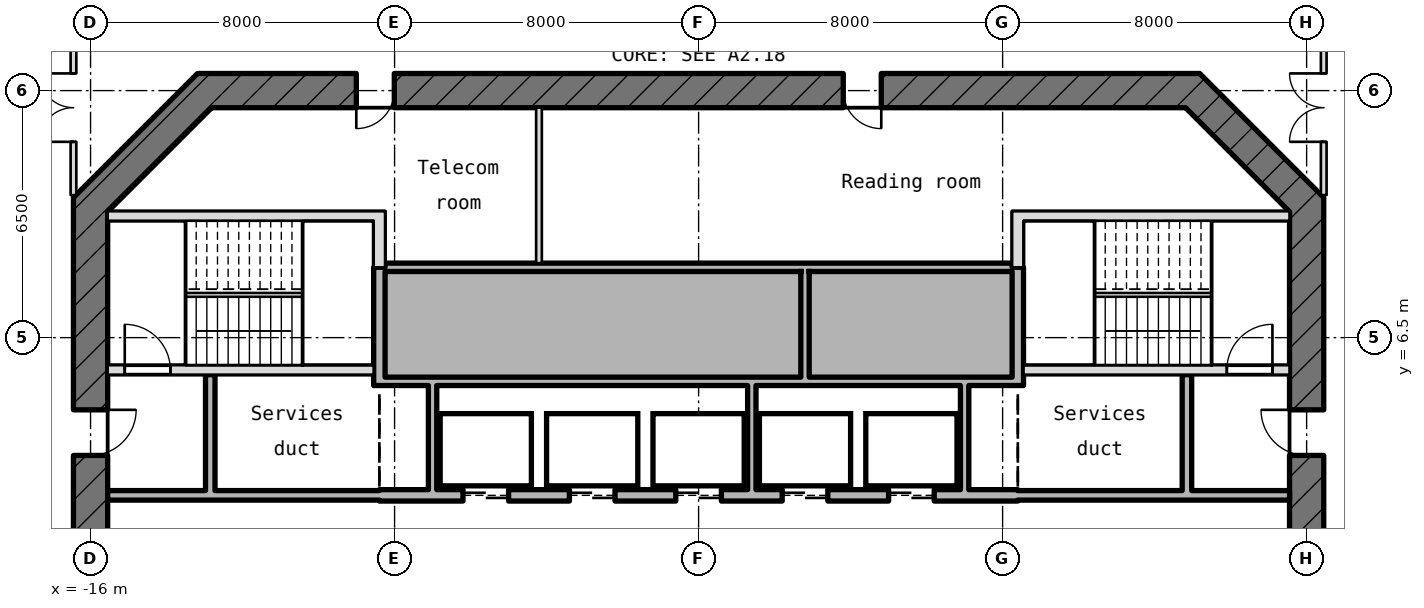
"""IFC4 building model, lengths in metres.
Left out: names, types, materials, properties, quantities, classifications, styles, units other than length and angle.
Written with IfcOpenShell. Run it as: python <this file> out.ifc"""

import sys

from ifc_helpers import new_model, si_unit, direction, frame, frame_2d, origin, place, context, subcontext, project, spatial, rectangle, extrude, element, fill, save


model = new_model("IFC4")
c1 = context("Model", 3, precision=1e-05, world=origin(), true_north=direction((0.0, 1.0)))
c2 = subcontext(c1, "Body", "Model", "MODEL_VIEW")
j1 = project(units=[si_unit("LENGTHUNIT", "METRE"), si_unit("PLANEANGLEUNIT", "RADIAN")], contexts=[c1])
p1 = place(None, origin())
s1 = spatial("IfcSite", under=j1, at=p1, CompositionType="ELEMENT")
p2 = place(p1, origin())
s2 = spatial("IfcBuilding", under=s1, at=p2, CompositionType="ELEMENT")
p3 = place(p2, frame((0.0, 0.0, 185.95)))
s3 = spatial("IfcBuildingStorey", under=s2, at=p3, CompositionType="ELEMENT", Elevation=185.95)
p4 = place(p3, frame((16.0, -10.186, -0.18), z_axis=(0.0, 0.0, 1.0), x_axis=(0.0, 1.0, 0.0)))
e1 = element("IfcWall", 1, at=p4, inside=s3, PredefinedType="SHEAR", context=c2, shape_type="SweptSolid", body=[
    extrude(rectangle(XDim=20.373, YDim=0.9, at=frame_2d((10.186, 0.0))), origin(), (0.0, 0.0, 1.0), 4.15),
])
p5 = place(p4, frame((8.986, 0.0, 0.18)))
e2 = element("IfcOpeningElement", 2, at=p5, cuts=e1, PredefinedType="OPENING", context=c2, shape_type="SweptSolid", body=[
    extrude(rectangle(XDim=2.4, YDim=2.1, at=frame_2d((1.2, 1.05))), frame((0.0, 0.46, 0.0), z_axis=(0.0, -1.0, 0.0), x_axis=(1.0, 0.0, 0.0)), (0.0, 0.0, 1.0), 0.92),
])
p6 = place(p4, frame((13.586, 0.0, 0.18)))
e3 = element("IfcOpeningElement", 3, at=p6, cuts=e1, PredefinedType="OPENING", context=c2, shape_type="SweptSolid", body=[
    extrude(rectangle(XDim=1.2, YDim=2.1, at=frame_2d((0.6, 1.05))), frame((0.0, 0.46, 0.0), z_axis=(0.0, -1.0, 0.0), x_axis=(1.0, 0.0, 0.0)), (0.0, 0.0, 1.0), 0.92),
])
p7 = place(p4, frame((2.4, 0.0, 0.18)))
e4 = element("IfcOpeningElement", 4, at=p7, cuts=e1, PredefinedType="OPENING", context=c2, shape_type="SweptSolid", body=[
    extrude(rectangle(XDim=1.2, YDim=2.1, at=frame_2d((0.6, 1.05))), frame((0.0, 0.46, 0.0), z_axis=(0.0, -1.0, 0.0), x_axis=(1.0, 0.0, 0.0)), (0.0, 0.0, 1.0), 0.92),
])
p8 = place(p3, frame((16.132, 9.868, -0.18), z_axis=(0.0, 0.0, 1.0), x_axis=(-0.707106781187, 0.707106781187, 0.0)))
e5 = element("IfcWall", 5, at=p8, inside=s3, PredefinedType="SHEAR", context=c2, shape_type="SweptSolid", body=[
    extrude(rectangle(XDim=4.615, YDim=0.9, at=frame_2d((2.308, 0.0))), origin(), (0.0, 0.0, 1.0), 4.15),
])
p9 = place(p3, frame((13.186, 13.0, -0.18), z_axis=(0.0, 0.0, 1.0), x_axis=(-1.0, 0.0, 0.0)))
e6 = element("IfcWall", 6, at=p9, inside=s3, PredefinedType="SHEAR", context=c2, shape_type="SweptSolid", body=[
    extrude(rectangle(XDim=26.373, YDim=0.9, at=frame_2d((13.186, 0.0))), origin(), (0.0, 0.0, 1.0), 4.15),
])
p10 = place(p9, frame((21.193, 0.0, 0.18)))
e7 = element("IfcOpeningElement", 7, at=p10, cuts=e6, PredefinedType="OPENING", context=c2, shape_type="SweptSolid", body=[
    extrude(rectangle(XDim=1.0, YDim=2.1, at=frame_2d((0.5, 1.05))), frame((0.0, 0.46, 0.0), z_axis=(0.0, -1.0, 0.0), x_axis=(1.0, 0.0, 0.0)), (0.0, 0.0, 1.0), 0.92),
])
p11 = place(p9, frame((8.379, 0.0, 0.18)))
e8 = element("IfcOpeningElement", 8, at=p11, cuts=e6, PredefinedType="OPENING", context=c2, shape_type="SweptSolid", body=[
    extrude(rectangle(XDim=1.0, YDim=2.1, at=frame_2d((0.5, 1.05))), frame((0.0, 0.46, 0.0), z_axis=(0.0, -1.0, 0.0), x_axis=(1.0, 0.0, 0.0)), (0.0, 0.0, 1.0), 0.92),
])
p12 = place(p3, frame((-12.868, 13.132, -0.18), z_axis=(0.0, 0.0, 1.0), x_axis=(-0.707106781187, -0.707106781187, 0.0)))
e9 = element("IfcWall", 9, at=p12, inside=s3, PredefinedType="SHEAR", context=c2, shape_type="SweptSolid", body=[
    extrude(rectangle(XDim=4.615, YDim=0.9, at=frame_2d((2.308, 0.0))), origin(), (0.0, 0.0, 1.0), 4.15),
])
p13 = place(p3, frame((-16.0, 10.186, -0.18), z_axis=(0.0, 0.0, 1.0), x_axis=(0.0, -1.0, 0.0)))
e10 = element("IfcWall", 10, at=p13, inside=s3, PredefinedType="SHEAR", context=c2, shape_type="SweptSolid", body=[
    extrude(rectangle(XDim=20.373, YDim=0.9, at=frame_2d((10.186, 0.0))), origin(), (0.0, 0.0, 1.0), 4.15),
])
p14 = place(p13, frame((8.986, 0.0, 0.18)))
e11 = element("IfcOpeningElement", 11, at=p14, cuts=e10, PredefinedType="OPENING", context=c2, shape_type="SweptSolid", body=[
    extrude(rectangle(XDim=2.4, YDim=2.1, at=frame_2d((1.2, 1.05))), frame((0.0, 0.46, 0.0), z_axis=(0.0, -1.0, 0.0), x_axis=(1.0, 0.0, 0.0)), (0.0, 0.0, 1.0), 0.92),
])
p15 = place(p13, frame((5.586, 0.0, 0.18)))
e12 = element("IfcOpeningElement", 12, at=p15, cuts=e10, PredefinedType="OPENING", context=c2, shape_type="SweptSolid", body=[
    extrude(rectangle(XDim=1.2, YDim=2.1, at=frame_2d((0.6, 1.05))), frame((0.0, 0.46, 0.0), z_axis=(0.0, -1.0, 0.0), x_axis=(1.0, 0.0, 0.0)), (0.0, 0.0, 1.0), 0.92),
])
p16 = place(p3, frame((-15.55, 2.35, 0.0), z_axis=(0.0, 0.0, 1.0), x_axis=(1.0, 0.0, 0.0)))
e13 = element("IfcWall", 13, at=p16, inside=s3, PredefinedType="STANDARD", context=c2, shape_type="SweptSolid", body=[
    extrude(rectangle(XDim=7.15, YDim=0.25, at=frame_2d((3.575, 0.0))), origin(), (0.0, 0.0, 1.0), 3.97),
])
p17 = place(p3, frame((-8.4, 2.35, -0.18), z_axis=(0.0, 0.0, 1.0), x_axis=(1.0, 0.0, 0.0)))
e14 = element("IfcWall", 14, at=p17, inside=s3, PredefinedType="SHEAR", context=c2, shape_type="SweptSolid", body=[
    extrude(rectangle(XDim=16.8, YDim=0.3, at=frame_2d((8.4, 0.0))), origin(), (0.0, 0.0, 1.0), 4.15),
])
p18 = place(p17, frame((2.2, 0.0, 0.18)))
e15 = element("IfcOpeningElement", 15, at=p18, cuts=e14, PredefinedType="OPENING", context=c2, shape_type="SweptSolid", body=[
    extrude(rectangle(XDim=1.2, YDim=2.1, at=frame_2d((0.6, 1.05))), frame((0.0, 0.16, 0.0), z_axis=(0.0, -1.0, 0.0), x_axis=(1.0, 0.0, 0.0)), (0.0, 0.0, 1.0), 0.32),
])
p19 = place(p17, frame((5.0, 0.0, 0.18)))
e16 = element("IfcOpeningElement", 16, at=p19, cuts=e14, PredefinedType="OPENING", context=c2, shape_type="SweptSolid", body=[
    extrude(rectangle(XDim=1.2, YDim=2.1, at=frame_2d((0.6, 1.05))), frame((0.0, 0.16, 0.0), z_axis=(0.0, -1.0, 0.0), x_axis=(1.0, 0.0, 0.0)), (0.0, 0.0, 1.0), 0.32),
])
p20 = place(p17, frame((7.8, 0.0, 0.18)))
e17 = element("IfcOpeningElement", 17, at=p20, cuts=e14, PredefinedType="OPENING", context=c2, shape_type="SweptSolid", body=[
    extrude(rectangle(XDim=1.2, YDim=2.1, at=frame_2d((0.6, 1.05))), frame((0.0, 0.16, 0.0), z_axis=(0.0, -1.0, 0.0), x_axis=(1.0, 0.0, 0.0)), (0.0, 0.0, 1.0), 0.32),
])
p21 = place(p17, frame((10.6, 0.0, 0.18)))
e18 = element("IfcOpeningElement", 18, at=p21, cuts=e14, PredefinedType="OPENING", context=c2, shape_type="SweptSolid", body=[
    extrude(rectangle(XDim=1.2, YDim=2.1, at=frame_2d((0.6, 1.05))), frame((0.0, 0.16, 0.0), z_axis=(0.0, -1.0, 0.0), x_axis=(1.0, 0.0, 0.0)), (0.0, 0.0, 1.0), 0.32),
])
p22 = place(p17, frame((13.4, 0.0, 0.18)))
e19 = element("IfcOpeningElement", 19, at=p22, cuts=e14, PredefinedType="OPENING", context=c2, shape_type="SweptSolid", body=[
    extrude(rectangle(XDim=1.2, YDim=2.1, at=frame_2d((0.6, 1.05))), frame((0.0, 0.16, 0.0), z_axis=(0.0, -1.0, 0.0), x_axis=(1.0, 0.0, 0.0)), (0.0, 0.0, 1.0), 0.32),
])
p23 = place(p3, frame((8.4, 2.35, 0.0), z_axis=(0.0, 0.0, 1.0), x_axis=(1.0, 0.0, 0.0)))
e20 = element("IfcWall", 20, at=p23, inside=s3, PredefinedType="STANDARD", context=c2, shape_type="SweptSolid", body=[
    extrude(rectangle(XDim=7.15, YDim=0.25, at=frame_2d((3.575, 0.0))), origin(), (0.0, 0.0, 1.0), 3.97),
])
p24 = place(p3, frame((-8.25, 5.35, 0.0), z_axis=(0.0, 0.0, 1.0), x_axis=(1.0, 0.0, 0.0)))
e21 = element("IfcWall", 21, at=p24, inside=s3, PredefinedType="STANDARD", context=c2, shape_type="SweptSolid", body=[
    extrude(rectangle(XDim=16.5, YDim=0.22, at=frame_2d((8.25, 0.0))), origin(), (0.0, 0.0, 1.0), 3.97),
])
p25 = place(p3, frame((-15.55, 5.65, -0.18), z_axis=(0.0, 0.0, 1.0), x_axis=(1.0, 0.0, 0.0)))
e22 = element("IfcWall", 22, at=p25, inside=s3, PredefinedType="SHEAR", context=c2, shape_type="SweptSolid", body=[
    extrude(rectangle(XDim=7.0, YDim=0.25, at=frame_2d((3.5, 0.0))), origin(), (0.0, 0.0, 1.0), 4.15),
])
p26 = place(p25, frame((0.45, 0.0, 0.18)))
e23 = element("IfcOpeningElement", 23, at=p26, cuts=e22, PredefinedType="OPENING", context=c2, shape_type="SweptSolid", body=[
    extrude(rectangle(XDim=1.2, YDim=2.1, at=frame_2d((0.6, 1.05))), frame((0.0, 0.135, 0.0), z_axis=(0.0, -1.0, 0.0), x_axis=(1.0, 0.0, 0.0)), (0.0, 0.0, 1.0), 0.27),
])
p27 = place(p3, frame((8.55, 5.65, -0.18), z_axis=(0.0, 0.0, 1.0), x_axis=(1.0, 0.0, 0.0)))
e24 = element("IfcWall", 24, at=p27, inside=s3, PredefinedType="SHEAR", context=c2, shape_type="SweptSolid", body=[
    extrude(rectangle(XDim=7.0, YDim=0.25, at=frame_2d((3.5, 0.0))), origin(), (0.0, 0.0, 1.0), 4.15),
])
p28 = place(p27, frame((5.35, 0.0, 0.18)))
e25 = element("IfcOpeningElement", 25, at=p28, cuts=e24, PredefinedType="OPENING", context=c2, shape_type="SweptSolid", body=[
    extrude(rectangle(XDim=1.2, YDim=2.1, at=frame_2d((0.6, 1.05))), frame((0.0, 0.135, 0.0), z_axis=(0.0, -1.0, 0.0), x_axis=(1.0, 0.0, 0.0)), (0.0, 0.0, 1.0), 0.27),
])
p29 = place(p3, frame((-8.25, 8.35, 0.0), z_axis=(0.0, 0.0, 1.0), x_axis=(1.0, 0.0, 0.0)))
e26 = element("IfcWall", 26, at=p29, inside=s3, PredefinedType="STANDARD", context=c2, shape_type="SweptSolid", body=[
    extrude(rectangle(XDim=16.5, YDim=0.22, at=frame_2d((8.25, 0.0))), origin(), (0.0, 0.0, 1.0), 3.97),
])
for number, where, z_axis, x_axis in (
    (27, (-15.55, 9.7, -0.18), (0.0, 0.0, 1.0), (1.0, 0.0, 0.0)),
    (28, (8.55, 9.7, -0.18), (0.0, 0.0, 1.0), (1.0, 0.0, 0.0)),
):
    element("IfcWall", number, at=place(p3, frame(where, z_axis=z_axis, x_axis=x_axis)), inside=s3, PredefinedType="SHEAR", context=c2, shape_type="SweptSolid", body=[
        extrude(rectangle(XDim=7.0, YDim=0.25, at=frame_2d((3.5, 0.0))), origin(), (0.0, 0.0, 1.0), 4.15),
    ])
p30 = place(p3, frame((-12.85, 2.475, 0.0), z_axis=(0.0, 0.0, 1.0), x_axis=(0.0, 1.0, 0.0)))
e29 = element("IfcWall", 29, at=p30, inside=s3, PredefinedType="STANDARD", context=c2, shape_type="SweptSolid", body=[
    extrude(rectangle(XDim=3.05, YDim=0.25, at=frame_2d((1.525, 0.0))), origin(), (0.0, 0.0, 1.0), 3.97),
])
p31 = place(p3, frame((-8.4, 5.24, -0.18), z_axis=(0.0, 0.0, 1.0), x_axis=(0.0, 1.0, 0.0)))
e30 = element("IfcWall", 30, at=p31, inside=s3, PredefinedType="SHEAR", context=c2, shape_type="SweptSolid", body=[
    extrude(rectangle(XDim=3.11, YDim=0.3, at=frame_2d((1.555, 0.0))), origin(), (0.0, 0.0, 1.0), 4.15),
])
p32 = place(p3, frame((-8.4, 8.35, -0.18), z_axis=(0.0, 0.0, 1.0), x_axis=(0.0, 1.0, 0.0)))
e31 = element("IfcWall", 31, at=p32, inside=s3, PredefinedType="SHEAR", context=c2, shape_type="SweptSolid", body=[
    extrude(rectangle(XDim=1.475, YDim=0.3, at=frame_2d((0.737, 0.0))), origin(), (0.0, 0.0, 1.0), 4.15),
])
p33 = place(p3, frame((-7.0, 2.5, 0.0), z_axis=(0.0, 0.0, 1.0), x_axis=(0.0, 1.0, 0.0)))
e32 = element("IfcWall", 32, at=p33, inside=s3, PredefinedType="STANDARD", context=c2, shape_type="SweptSolid", body=[
    extrude(rectangle(XDim=2.74, YDim=0.22, at=frame_2d((1.37, 0.0))), origin(), (0.0, 0.0, 1.0), 3.97),
])
p34 = place(p3, frame((-4.2, 8.46, 0.0), z_axis=(0.0, 0.0, 1.0), x_axis=(0.0, 1.0, 0.0)))
e33 = element("IfcWall", 33, at=p34, inside=s3, PredefinedType="PARTITIONING", context=c2, shape_type="SweptSolid", body=[
    extrude(rectangle(XDim=4.09, YDim=0.15, at=frame_2d((2.045, 0.0))), origin(), (0.0, 0.0, 1.0), 3.97),
])
p35 = place(p3, frame((1.4, 2.5, 0.0), z_axis=(0.0, 0.0, 1.0), x_axis=(0.0, 1.0, 0.0)))
e34 = element("IfcWall", 34, at=p35, inside=s3, PredefinedType="STANDARD", context=c2, shape_type="SweptSolid", body=[
    extrude(rectangle(XDim=2.74, YDim=0.22, at=frame_2d((1.37, 0.0))), origin(), (0.0, 0.0, 1.0), 3.97),
])
p36 = place(p3, frame((2.8, 5.46, 0.0), z_axis=(0.0, 0.0, 1.0), x_axis=(0.0, 1.0, 0.0)))
e35 = element("IfcWall", 35, at=p36, inside=s3, PredefinedType="STANDARD", context=c2, shape_type="SweptSolid", body=[
    extrude(rectangle(XDim=2.78, YDim=0.22, at=frame_2d((1.39, 0.0))), origin(), (0.0, 0.0, 1.0), 3.97),
])
p37 = place(p3, frame((7.0, 2.5, 0.0), z_axis=(0.0, 0.0, 1.0), x_axis=(0.0, 1.0, 0.0)))
e36 = element("IfcWall", 36, at=p37, inside=s3, PredefinedType="STANDARD", context=c2, shape_type="SweptSolid", body=[
    extrude(rectangle(XDim=2.74, YDim=0.22, at=frame_2d((1.37, 0.0))), origin(), (0.0, 0.0, 1.0), 3.97),
])
p38 = place(p3, frame((8.4, 5.24, -0.18), z_axis=(0.0, 0.0, 1.0), x_axis=(0.0, 1.0, 0.0)))
e37 = element("IfcWall", 37, at=p38, inside=s3, PredefinedType="SHEAR", context=c2, shape_type="SweptSolid", body=[
    extrude(rectangle(XDim=3.11, YDim=0.3, at=frame_2d((1.555, 0.0))), origin(), (0.0, 0.0, 1.0), 4.15),
])
p39 = place(p3, frame((8.4, 8.35, -0.18), z_axis=(0.0, 0.0, 1.0), x_axis=(0.0, 1.0, 0.0)))
e38 = element("IfcWall", 38, at=p39, inside=s3, PredefinedType="SHEAR", context=c2, shape_type="SweptSolid", body=[
    extrude(rectangle(XDim=1.475, YDim=0.3, at=frame_2d((0.737, 0.0))), origin(), (0.0, 0.0, 1.0), 4.15),
])
p40 = place(p3, frame((12.85, 2.475, 0.0), z_axis=(0.0, 0.0, 1.0), x_axis=(0.0, 1.0, 0.0)))
e39 = element("IfcWall", 39, at=p40, inside=s3, PredefinedType="STANDARD", context=c2, shape_type="SweptSolid", body=[
    extrude(rectangle(XDim=3.05, YDim=0.25, at=frame_2d((1.525, 0.0))), origin(), (0.0, 0.0, 1.0), 3.97),
])
p41 = place(p3, frame((-16.45, 10.25, 0.0), z_axis=(0.0, 0.0, 1.0), x_axis=(0.0, 1.0, 0.0)))
e40 = element("IfcWall", 40, at=p41, inside=s3, PredefinedType="PARTITIONING", context=c2, shape_type="SweptSolid", body=[
    extrude(rectangle(XDim=7.016, YDim=0.15, at=frame_2d((3.508, 0.0))), origin(), (0.0, 0.0, 1.0), 3.97),
])
p42 = place(p41, frame((1.402, 0.0, 0.0)))
e41 = element("IfcOpeningElement", 41, at=p42, cuts=e40, PredefinedType="OPENING", context=c2, shape_type="SweptSolid", body=[
    extrude(rectangle(XDim=1.8, YDim=2.1, at=frame_2d((0.9, 1.05))), frame((0.0, 0.085, 0.0), z_axis=(0.0, -1.0, 0.0), x_axis=(1.0, 0.0, 0.0)), (0.0, 0.0, 1.0), 0.17),
])
p43 = place(p3, frame((16.45, 10.25, 0.0), z_axis=(0.0, 0.0, 1.0), x_axis=(0.0, 1.0, 0.0)))
e42 = element("IfcWall", 42, at=p43, inside=s3, PredefinedType="PARTITIONING", context=c2, shape_type="SweptSolid", body=[
    extrude(rectangle(XDim=7.016, YDim=0.15, at=frame_2d((3.508, 0.0))), origin(), (0.0, 0.0, 1.0), 3.97),
])
p44 = place(p43, frame((1.402, 0.0, 0.0)))
e43 = element("IfcOpeningElement", 43, at=p44, cuts=e42, PredefinedType="OPENING", context=c2, shape_type="SweptSolid", body=[
    extrude(rectangle(XDim=1.8, YDim=2.1, at=frame_2d((0.9, 1.05))), frame((0.0, 0.085, 0.0), z_axis=(0.0, -1.0, 0.0), x_axis=(1.0, 0.0, 0.0)), (0.0, 0.0, 1.0), 0.17),
])
p45 = place(p18, origin())
e44 = element("IfcDoor", 44, at=p45, inside=s3, OperationType="DOUBLE_DOOR_SLIDING", PredefinedType="DOOR", context=c2, shape_type="SweptSolid", body=[
    extrude(rectangle(XDim=1.2, YDim=2.1, at=frame_2d((0.6, 1.05))), frame((0.0, 0.025, 0.0), z_axis=(0.0, -1.0, 0.0), x_axis=(1.0, 0.0, 0.0)), (0.0, 0.0, 1.0), 0.05),
])
fill(e15, e44)
p46 = place(p19, origin())
e45 = element("IfcDoor", 45, at=p46, inside=s3, OperationType="DOUBLE_DOOR_SLIDING", PredefinedType="DOOR", context=c2, shape_type="SweptSolid", body=[
    extrude(rectangle(XDim=1.2, YDim=2.1, at=frame_2d((0.6, 1.05))), frame((0.0, 0.025, 0.0), z_axis=(0.0, -1.0, 0.0), x_axis=(1.0, 0.0, 0.0)), (0.0, 0.0, 1.0), 0.05),
])
fill(e16, e45)
p47 = place(p20, origin())
e46 = element("IfcDoor", 46, at=p47, inside=s3, OperationType="DOUBLE_DOOR_SLIDING", PredefinedType="DOOR", context=c2, shape_type="SweptSolid", body=[
    extrude(rectangle(XDim=1.2, YDim=2.1, at=frame_2d((0.6, 1.05))), frame((0.0, 0.025, 0.0), z_axis=(0.0, -1.0, 0.0), x_axis=(1.0, 0.0, 0.0)), (0.0, 0.0, 1.0), 0.05),
])
fill(e17, e46)
p48 = place(p21, origin())
e47 = element("IfcDoor", 47, at=p48, inside=s3, OperationType="DOUBLE_DOOR_SLIDING", PredefinedType="DOOR", context=c2, shape_type="SweptSolid", body=[
    extrude(rectangle(XDim=1.2, YDim=2.1, at=frame_2d((0.6, 1.05))), frame((0.0, 0.025, 0.0), z_axis=(0.0, -1.0, 0.0), x_axis=(1.0, 0.0, 0.0)), (0.0, 0.0, 1.0), 0.05),
])
fill(e18, e47)
p49 = place(p22, origin())
e48 = element("IfcDoor", 48, at=p49, inside=s3, OperationType="DOUBLE_DOOR_SLIDING", PredefinedType="DOOR", context=c2, shape_type="SweptSolid", body=[
    extrude(rectangle(XDim=1.2, YDim=2.1, at=frame_2d((0.6, 1.05))), frame((0.0, 0.025, 0.0), z_axis=(0.0, -1.0, 0.0), x_axis=(1.0, 0.0, 0.0)), (0.0, 0.0, 1.0), 0.05),
])
fill(e19, e48)
p50 = place(p26, origin())
e49 = element("IfcDoor", 49, at=p50, inside=s3, OperationType="SINGLE_SWING_RIGHT", PredefinedType="DOOR", context=c2, shape_type="SweptSolid", body=[
    extrude(rectangle(XDim=1.2, YDim=2.1, at=frame_2d((0.6, 1.05))), frame((0.0, 0.025, 0.0), z_axis=(0.0, -1.0, 0.0), x_axis=(1.0, 0.0, 0.0)), (0.0, 0.0, 1.0), 0.05),
])
fill(e23, e49)
p51 = place(p28, origin())
e50 = element("IfcDoor", 50, at=p51, inside=s3, OperationType="SINGLE_SWING_RIGHT", PredefinedType="DOOR", context=c2, shape_type="SweptSolid", body=[
    extrude(rectangle(XDim=1.2, YDim=2.1, at=frame_2d((0.6, 1.05))), frame((0.0, 0.025, 0.0), z_axis=(0.0, -1.0, 0.0), x_axis=(1.0, 0.0, 0.0)), (0.0, 0.0, 1.0), 0.05),
])
fill(e25, e50)
p52 = place(p15, origin())
e51 = element("IfcDoor", 51, at=p52, inside=s3, OperationType="SINGLE_SWING_RIGHT", PredefinedType="DOOR", context=c2, shape_type="SweptSolid", body=[
    extrude(rectangle(XDim=1.2, YDim=2.1, at=frame_2d((0.6, 1.05))), frame((0.0, 0.025, 0.0), z_axis=(0.0, -1.0, 0.0), x_axis=(1.0, 0.0, 0.0)), (0.0, 0.0, 1.0), 0.05),
])
fill(e12, e51)
p53 = place(p6, origin())
e52 = element("IfcDoor", 52, at=p53, inside=s3, OperationType="SINGLE_SWING_RIGHT", PredefinedType="DOOR", context=c2, shape_type="SweptSolid", body=[
    extrude(rectangle(XDim=1.2, YDim=2.1, at=frame_2d((0.6, 1.05))), frame((0.0, 0.025, 0.0), z_axis=(0.0, -1.0, 0.0), x_axis=(1.0, 0.0, 0.0)), (0.0, 0.0, 1.0), 0.05),
])
fill(e3, e52)
p54 = place(p10, origin())
e53 = element("IfcDoor", 53, at=p54, inside=s3, OperationType="SINGLE_SWING_RIGHT", PredefinedType="DOOR", context=c2, shape_type="SweptSolid", body=[
    extrude(rectangle(XDim=1.0, YDim=2.1, at=frame_2d((0.5, 1.05))), frame((0.0, 0.025, 0.0), z_axis=(0.0, -1.0, 0.0), x_axis=(1.0, 0.0, 0.0)), (0.0, 0.0, 1.0), 0.05),
])
fill(e7, e53)
p55 = place(p11, origin())
e54 = element("IfcDoor", 54, at=p55, inside=s3, OperationType="SINGLE_SWING_RIGHT", PredefinedType="DOOR", context=c2, shape_type="SweptSolid", body=[
    extrude(rectangle(XDim=1.0, YDim=2.1, at=frame_2d((0.5, 1.05))), frame((0.0, 0.025, 0.0), z_axis=(0.0, -1.0, 0.0), x_axis=(1.0, 0.0, 0.0)), (0.0, 0.0, 1.0), 0.05),
])
fill(e8, e54)
p56 = place(p42, origin())
e55 = element("IfcDoor", 55, at=p56, inside=s3, OperationType="DOUBLE_DOOR_SINGLE_SWING", PredefinedType="DOOR", context=c2, shape_type="SweptSolid", body=[
    extrude(rectangle(XDim=1.8, YDim=2.1, at=frame_2d((0.9, 1.05))), frame((0.0, 0.025, 0.0), z_axis=(0.0, -1.0, 0.0), x_axis=(1.0, 0.0, 0.0)), (0.0, 0.0, 1.0), 0.05),
])
fill(e41, e55)
p57 = place(p44, origin())
e56 = element("IfcDoor", 56, at=p57, inside=s3, OperationType="DOUBLE_DOOR_SINGLE_SWING", PredefinedType="DOOR", context=c2, shape_type="SweptSolid", body=[
    extrude(rectangle(XDim=1.8, YDim=2.1, at=frame_2d((0.9, 1.05))), frame((0.0, 0.025, 0.0), z_axis=(0.0, -1.0, 0.0), x_axis=(1.0, 0.0, 0.0)), (0.0, 0.0, 1.0), 0.05),
])
fill(e43, e56)
save(model, sys.argv[1])
